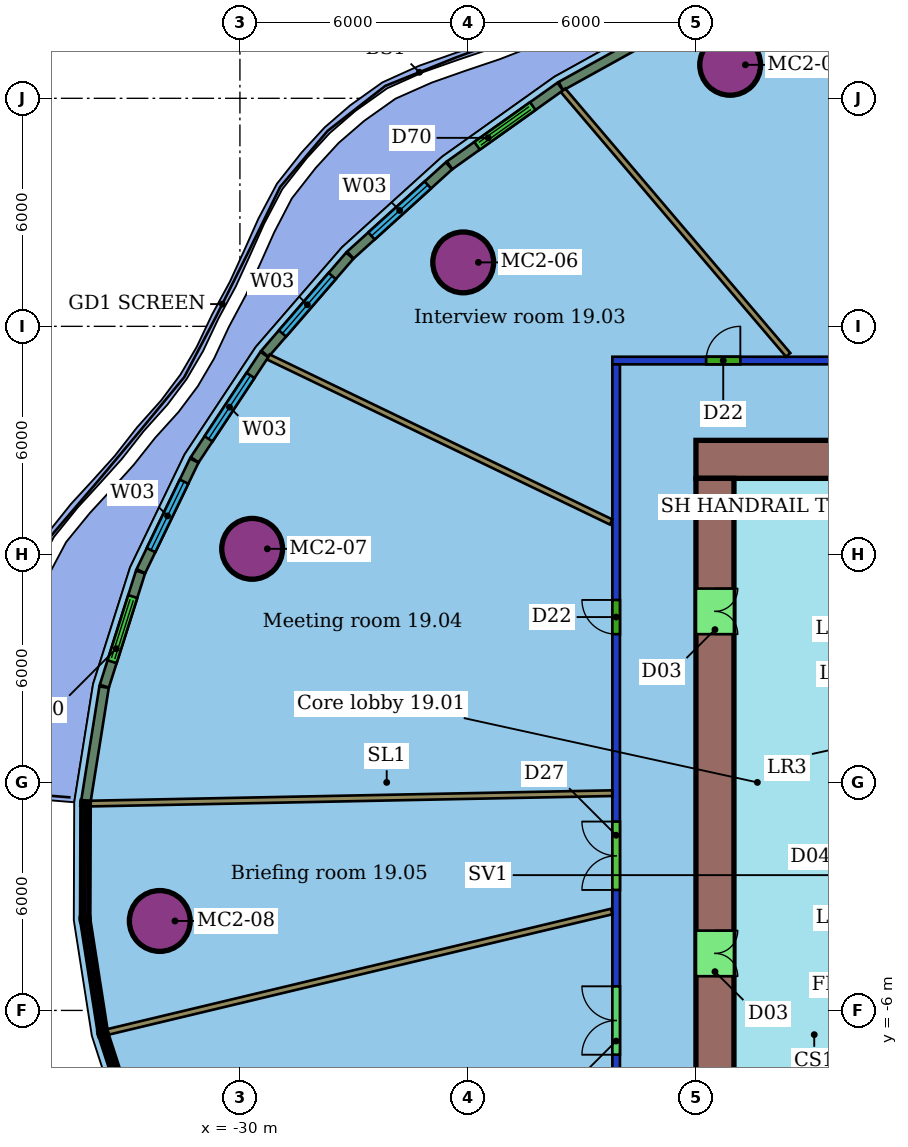
"""IFC4 building model, lengths in metres.
Left out: names, types, materials, properties, quantities, classifications, styles, units other than length and angle.
Written with IfcOpenShell. Run it as: python <this file> out.ifc"""

import sys

from ifc_helpers import new_model, si_unit, direction, frame, frame_2d, origin, origin_2d, place, context, subcontext, project, spatial, rectangle, hollow_circle, extrude, element, fill, save


model = new_model("IFC4")
c1 = context("Model", 3, precision=1e-05, world=origin(), true_north=direction((0.0, 1.0)))
c2 = subcontext(c1, "Body", "Model", "MODEL_VIEW")
j1 = project(units=[si_unit("LENGTHUNIT", "METRE"), si_unit("PLANEANGLEUNIT", "RADIAN")], contexts=[c1])
p1 = place(None, origin())
s1 = spatial("IfcSite", under=j1, at=p1, CompositionType="ELEMENT")
p2 = place(p1, origin())
s2 = spatial("IfcBuilding", under=s1, at=p2, CompositionType="ELEMENT")
p3 = place(p2, frame((0.0, 0.0, 88.6)))
s3 = spatial("IfcBuildingStorey", under=s2, at=p3, CompositionType="ELEMENT", Elevation=88.6)
for number, where, z_axis, x_axis in (
    (1, (-17.1, 18.881, 0.0), (0.0, 0.0, 1.0), (1.0, 0.0, 0.0)),
    (2, (-24.125, 13.683, 0.0), (0.0, 0.0, 1.0), (1.0, 0.0, 0.0)),
    (3, (-29.679, 6.146, 0.0), (0.0, 0.0, 1.0), (1.0, 0.0, 0.0)),
    (4, (-32.109, -3.646, 0.0), (0.0, 0.0, 1.0), (1.0, 0.0, 0.0)),
):
    element("IfcColumn", number, at=place(p3, frame(where, z_axis=z_axis, x_axis=x_axis)), inside=s3, PredefinedType="COLUMN", context=c2, shape_type="SweptSolid", body=[
        extrude(hollow_circle(Radius=0.8, WallThickness=0.055, at=origin_2d()), origin(), (0.0, 0.0, 1.0), 3.45),
    ])
p4 = place(p3, frame((-20.1, -11.0, 0.0), z_axis=(0.0, 0.0, 1.0), x_axis=(0.0, 1.0, 0.0)))
e5 = element("IfcWall", 5, at=p4, inside=s3, PredefinedType="PARTITIONING", context=c2, shape_type="SweptSolid", body=[
    extrude(rectangle(XDim=22.0, YDim=0.2, at=frame_2d((11.0, 0.0))), origin(), (0.0, 0.0, 1.0), 3.0),
])
p5 = place(p4, frame((14.9, 0.0, 0.0)))
e6 = element("IfcOpeningElement", 6, at=p5, cuts=e5, PredefinedType="OPENING", context=c2, shape_type="SweptSolid", body=[
    extrude(rectangle(XDim=0.9, YDim=2.1, at=frame_2d((0.45, 1.05))), frame((0.0, 0.11, 0.0), z_axis=(0.0, -1.0, 0.0), x_axis=(1.0, 0.0, 0.0)), (0.0, 0.0, 1.0), 0.22),
])
p6 = place(p4, frame((8.17, 0.0, 0.0)))
e7 = element("IfcOpeningElement", 7, at=p6, cuts=e5, PredefinedType="OPENING", context=c2, shape_type="SweptSolid", body=[
    extrude(rectangle(XDim=1.8, YDim=2.4, at=frame_2d((0.9, 1.2))), frame((0.0, 0.11, 0.0), z_axis=(0.0, -1.0, 0.0), x_axis=(1.0, 0.0, 0.0)), (0.0, 0.0, 1.0), 0.22),
])
p7 = place(p4, frame((3.835, 0.0, 0.0)))
e8 = element("IfcOpeningElement", 8, at=p7, cuts=e5, PredefinedType="OPENING", context=c2, shape_type="SweptSolid", body=[
    extrude(rectangle(XDim=1.8, YDim=2.1, at=frame_2d((0.9, 1.05))), frame((0.0, 0.11, 0.0), z_axis=(0.0, -1.0, 0.0), x_axis=(1.0, 0.0, 0.0)), (0.0, 0.0, 1.0), 0.22),
])
p8 = place(p3, frame((-20.2, 11.1, 0.0), z_axis=(0.0, 0.0, 1.0), x_axis=(1.0, 0.0, 0.0)))
e9 = element("IfcWall", 9, at=p8, inside=s3, PredefinedType="PARTITIONING", context=c2, shape_type="SweptSolid", body=[
    extrude(rectangle(XDim=28.4, YDim=0.2, at=frame_2d((14.2, 0.0))), origin(), (0.0, 0.0, 1.0), 3.0),
])
p9 = place(p8, frame((21.231, 0.0, 0.0)))
e10 = element("IfcOpeningElement", 10, at=p9, cuts=e9, PredefinedType="OPENING", context=c2, shape_type="SweptSolid", body=[
    extrude(rectangle(XDim=1.8, YDim=2.1, at=frame_2d((0.9, 1.05))), frame((0.0, 0.11, 0.0), z_axis=(0.0, -1.0, 0.0), x_axis=(1.0, 0.0, 0.0)), (0.0, 0.0, 1.0), 0.22),
])
p10 = place(p8, frame((13.062, 0.0, 0.0)))
e11 = element("IfcOpeningElement", 11, at=p10, cuts=e9, PredefinedType="OPENING", context=c2, shape_type="SweptSolid", body=[
    extrude(rectangle(XDim=1.8, YDim=2.1, at=frame_2d((0.9, 1.05))), frame((0.0, 0.11, 0.0), z_axis=(0.0, -1.0, 0.0), x_axis=(1.0, 0.0, 0.0)), (0.0, 0.0, 1.0), 0.22),
])
p11 = place(p8, frame((2.468, 0.0, 0.0)))
e12 = element("IfcOpeningElement", 12, at=p11, cuts=e9, PredefinedType="OPENING", context=c2, shape_type="SweptSolid", body=[
    extrude(rectangle(XDim=0.9, YDim=2.1, at=frame_2d((0.45, 1.05))), frame((0.0, 0.11, 0.0), z_axis=(0.0, -1.0, 0.0), x_axis=(1.0, 0.0, 0.0)), (0.0, 0.0, 1.0), 0.22),
])
p12 = place(p3, frame((-21.496, 18.209, 0.0), z_axis=(0.0, 0.0, 1.0), x_axis=(0.648105775004, -0.761550329529, 0.0)))
e13 = element("IfcWall", 13, at=p12, inside=s3, PredefinedType="PARTITIONING", context=c2, shape_type="SweptSolid", body=[
    extrude(rectangle(XDim=9.14, YDim=0.15, at=frame_2d((4.57, 0.0))), origin(), (0.0, 0.0, 1.0), 3.45),
])
p13 = place(p3, frame((-29.251, 11.193, 0.0), z_axis=(0.0, 0.0, 1.0), x_axis=(0.901024974185, -0.433767213946, 0.0)))
e14 = element("IfcWall", 14, at=p13, inside=s3, PredefinedType="PARTITIONING", context=c2, shape_type="SweptSolid", body=[
    extrude(rectangle(XDim=10.009, YDim=0.15, at=frame_2d((5.004, 0.0))), origin(), (0.0, 0.0, 1.0), 3.45),
])
p14 = place(p3, frame((-33.937, -0.557, 0.0), z_axis=(0.0, 0.0, 1.0), x_axis=(0.999801195259, 0.019939156436, 0.0)))
e15 = element("IfcWall", 15, at=p14, inside=s3, PredefinedType="PARTITIONING", context=c2, shape_type="SweptSolid", body=[
    extrude(rectangle(XDim=13.738, YDim=0.15, at=frame_2d((6.869, 0.0))), origin(), (0.0, 0.0, 1.0), 3.45),
])
p15 = place(p3, frame((-33.484, -6.568, 0.0), z_axis=(0.0, 0.0, 1.0), x_axis=(0.972610744355, 0.232439970669, 0.0)))
e16 = element("IfcWall", 16, at=p15, inside=s3, PredefinedType="PARTITIONING", context=c2, shape_type="SweptSolid", body=[
    extrude(rectangle(XDim=13.64, YDim=0.15, at=frame_2d((6.82, 0.0))), origin(), (0.0, 0.0, 1.0), 3.45),
])
p16 = place(p3, frame((-18.415, 20.059, 0.0), z_axis=(0.0, 0.0, 1.0), x_axis=(-0.874740773149, -0.484591147042, 0.0)))
e17 = element("IfcWall", 17, at=p16, inside=s3, PredefinedType="SOLIDWALL", context=c2, shape_type="SweptSolid", body=[
    extrude(rectangle(XDim=3.588, YDim=0.25, at=frame_2d((1.794, 0.0))), origin(), (0.0, 0.0, 1.0), 3.05),
])
p17 = place(p3, frame((-21.572, 18.308, 0.0), z_axis=(0.0, 0.0, 1.0), x_axis=(-0.814702052805, -0.579879785089, 0.0)))
e18 = element("IfcWall", 18, at=p17, inside=s3, PredefinedType="SOLIDWALL", context=c2, shape_type="SweptSolid", body=[
    extrude(rectangle(XDim=3.572, YDim=0.25, at=frame_2d((1.786, 0.0))), origin(), (0.0, 0.0, 1.0), 3.05),
])
p18 = place(p17, frame((0.886, 0.0, 0.0)))
e19 = element("IfcOpeningElement", 19, at=p18, cuts=e18, PredefinedType="OPENING", context=c2, shape_type="SweptSolid", body=[
    extrude(rectangle(XDim=1.8, YDim=2.4, at=frame_2d((0.9, 1.2))), frame((0.0, 0.135, 0.0), z_axis=(0.0, -1.0, 0.0), x_axis=(1.0, 0.0, 0.0)), (0.0, 0.0, 1.0), 0.27),
])
p19 = place(p3, frame((-24.5, 16.223, 0.0), z_axis=(0.0, 0.0, 1.0), x_axis=(-0.741507668803, -0.670944391962, 0.0)))
e20 = element("IfcWall", 20, at=p19, inside=s3, PredefinedType="SOLIDWALL", context=c2, shape_type="SweptSolid", body=[
    extrude(rectangle(XDim=3.498, YDim=0.25, at=frame_2d((1.749, 0.0))), origin(), (0.0, 0.0, 1.0), 3.05),
])
p20 = place(p19, frame((0.749, 0.0, 0.9)))
e21 = element("IfcOpeningElement", 21, at=p20, cuts=e20, PredefinedType="OPENING", context=c2, shape_type="SweptSolid", body=[
    extrude(rectangle(XDim=2.0, YDim=2.1, at=frame_2d((1.0, 1.05))), frame((0.0, 0.135, 0.0), z_axis=(0.0, -1.0, 0.0), x_axis=(1.0, 0.0, 0.0)), (0.0, 0.0, 1.0), 0.27),
])
p21 = place(p3, frame((-27.11, 13.859, 0.0), z_axis=(0.0, 0.0, 1.0), x_axis=(-0.654178480437, -0.756340211633, 0.0)))
e22 = element("IfcWall", 22, at=p21, inside=s3, PredefinedType="SOLIDWALL", context=c2, shape_type="SweptSolid", body=[
    extrude(rectangle(XDim=3.413, YDim=0.25, at=frame_2d((1.706, 0.0))), origin(), (0.0, 0.0, 1.0), 3.05),
])
p22 = place(p21, frame((0.706, 0.0, 0.9)))
e23 = element("IfcOpeningElement", 23, at=p22, cuts=e22, PredefinedType="OPENING", context=c2, shape_type="SweptSolid", body=[
    extrude(rectangle(XDim=2.0, YDim=2.1, at=frame_2d((1.0, 1.05))), frame((0.0, 0.135, 0.0), z_axis=(0.0, -1.0, 0.0), x_axis=(1.0, 0.0, 0.0)), (0.0, 0.0, 1.0), 0.27),
])
p23 = place(p3, frame((-29.357, 11.259, 0.0), z_axis=(0.0, 0.0, 1.0), x_axis=(-0.551983407384, -0.83385509411, 0.0)))
e24 = element("IfcWall", 24, at=p23, inside=s3, PredefinedType="SOLIDWALL", context=c2, shape_type="SweptSolid", body=[
    extrude(rectangle(XDim=3.322, YDim=0.25, at=frame_2d((1.661, 0.0))), origin(), (0.0, 0.0, 1.0), 3.05),
])
p24 = place(p23, frame((0.661, 0.0, 0.9)))
e25 = element("IfcOpeningElement", 25, at=p24, cuts=e24, PredefinedType="OPENING", context=c2, shape_type="SweptSolid", body=[
    extrude(rectangle(XDim=2.0, YDim=2.1, at=frame_2d((1.0, 1.05))), frame((0.0, 0.135, 0.0), z_axis=(0.0, -1.0, 0.0), x_axis=(1.0, 0.0, 0.0)), (0.0, 0.0, 1.0), 0.27),
])
p25 = place(p3, frame((-31.203, 8.468, 0.0), z_axis=(0.0, 0.0, 1.0), x_axis=(-0.434506070547, -0.900668904014, 0.0)))
e26 = element("IfcWall", 26, at=p25, inside=s3, PredefinedType="SOLIDWALL", context=c2, shape_type="SweptSolid", body=[
    extrude(rectangle(XDim=3.231, YDim=0.25, at=frame_2d((1.616, 0.0))), origin(), (0.0, 0.0, 1.0), 3.05),
])
p26 = place(p25, frame((0.616, 0.0, 0.9)))
e27 = element("IfcOpeningElement", 27, at=p26, cuts=e26, PredefinedType="OPENING", context=c2, shape_type="SweptSolid", body=[
    extrude(rectangle(XDim=2.0, YDim=2.1, at=frame_2d((1.0, 1.05))), frame((0.0, 0.135, 0.0), z_axis=(0.0, -1.0, 0.0), x_axis=(1.0, 0.0, 0.0)), (0.0, 0.0, 1.0), 0.27),
])
p27 = place(p3, frame((-32.616, 5.533, 0.0), z_axis=(0.0, 0.0, 1.0), x_axis=(-0.302352129866, -0.953196301695, 0.0)))
e28 = element("IfcWall", 28, at=p27, inside=s3, PredefinedType="SOLIDWALL", context=c2, shape_type="SweptSolid", body=[
    extrude(rectangle(XDim=3.148, YDim=0.25, at=frame_2d((1.574, 0.0))), origin(), (0.0, 0.0, 1.0), 3.05),
])
p28 = place(p27, frame((0.674, 0.0, 0.0)))
e29 = element("IfcOpeningElement", 29, at=p28, cuts=e28, PredefinedType="OPENING", context=c2, shape_type="SweptSolid", body=[
    extrude(rectangle(XDim=1.8, YDim=2.4, at=frame_2d((0.9, 1.2))), frame((0.0, 0.135, 0.0), z_axis=(0.0, -1.0, 0.0), x_axis=(1.0, 0.0, 0.0)), (0.0, 0.0, 1.0), 0.27),
])
p29 = place(p3, frame((-33.574, 2.507, 0.0), z_axis=(0.0, 0.0, 1.0), x_axis=(-0.157539068882, -0.987512755247, 0.0)))
e30 = element("IfcWall", 30, at=p29, inside=s3, PredefinedType="SOLIDWALL", context=c2, shape_type="SweptSolid", body=[
    extrude(rectangle(XDim=3.037, YDim=0.25, at=frame_2d((1.519, 0.0))), origin(), (0.0, 0.0, 1.0), 3.05),
])
p30 = place(p3, frame((-6.0, 8.5, 0.0), z_axis=(0.0, 0.0, 1.0), x_axis=(-1.0, 0.0, 0.0)))
e31 = element("IfcWall", 31, at=p30, inside=s3, PredefinedType="SHEAR", context=c2, shape_type="SweptSolid", body=[
    extrude(rectangle(XDim=12.0, YDim=1.0, at=frame_2d((6.0, 0.0))), origin(), (0.0, 0.0, 1.0), 3.3),
])
p31 = place(p30, frame((5.2, 0.0, 0.0)))
e32 = element("IfcOpeningElement", 32, at=p31, cuts=e31, PredefinedType="OPENING", context=c2, shape_type="SweptSolid", body=[
    extrude(rectangle(XDim=1.2, YDim=2.1, at=frame_2d((0.6, 1.05))), frame((0.0, 0.51, 0.0), z_axis=(0.0, -1.0, 0.0), x_axis=(1.0, 0.0, 0.0)), (0.0, 0.0, 1.0), 1.02),
])
p32 = place(p3, frame((-17.5, 8.0, 0.0), z_axis=(0.0, 0.0, 1.0), x_axis=(0.0, -1.0, 0.0)))
e33 = element("IfcWall", 33, at=p32, inside=s3, PredefinedType="SHEAR", context=c2, shape_type="SweptSolid", body=[
    extrude(rectangle(XDim=16.0, YDim=1.0, at=frame_2d((8.0, 0.0))), origin(), (0.0, 0.0, 1.0), 3.3),
])
p33 = place(p32, frame((11.9, 0.0, 0.0)))
e34 = element("IfcOpeningElement", 34, at=p33, cuts=e33, PredefinedType="OPENING", context=c2, shape_type="SweptSolid", body=[
    extrude(rectangle(XDim=1.2, YDim=2.1, at=frame_2d((0.6, 1.05))), frame((0.0, 0.51, 0.0), z_axis=(0.0, -1.0, 0.0), x_axis=(1.0, 0.0, 0.0)), (0.0, 0.0, 1.0), 1.02),
])
p34 = place(p32, frame((2.9, 0.0, 0.0)))
e35 = element("IfcOpeningElement", 35, at=p34, cuts=e33, PredefinedType="OPENING", context=c2, shape_type="SweptSolid", body=[
    extrude(rectangle(XDim=1.2, YDim=2.1, at=frame_2d((0.6, 1.05))), frame((0.0, 0.51, 0.0), z_axis=(0.0, -1.0, 0.0), x_axis=(1.0, 0.0, 0.0)), (0.0, 0.0, 1.0), 1.02),
])
p35 = place(p11, origin())
e36 = element("IfcDoor", 36, at=p35, inside=s3, OperationType="SINGLE_SWING_RIGHT", PredefinedType="DOOR", context=c2, shape_type="SweptSolid", body=[
    extrude(rectangle(XDim=0.9, YDim=2.1, at=frame_2d((0.45, 1.05))), frame((0.0, 0.025, 0.0), z_axis=(0.0, -1.0, 0.0), x_axis=(1.0, 0.0, 0.0)), (0.0, 0.0, 1.0), 0.05),
])
fill(e12, e36)
p36 = place(p5, origin())
e37 = element("IfcDoor", 37, at=p36, inside=s3, OperationType="SINGLE_SWING_RIGHT", PredefinedType="DOOR", context=c2, shape_type="SweptSolid", body=[
    extrude(rectangle(XDim=0.9, YDim=2.1, at=frame_2d((0.45, 1.05))), frame((0.0, 0.025, 0.0), z_axis=(0.0, -1.0, 0.0), x_axis=(1.0, 0.0, 0.0)), (0.0, 0.0, 1.0), 0.05),
])
fill(e6, e37)
p37 = place(p6, origin())
e38 = element("IfcDoor", 38, at=p37, inside=s3, OperationType="DOUBLE_DOOR_SINGLE_SWING", PredefinedType="DOOR", context=c2, shape_type="SweptSolid", body=[
    extrude(rectangle(XDim=1.8, YDim=2.4, at=frame_2d((0.9, 1.2))), frame((0.0, 0.025, 0.0), z_axis=(0.0, -1.0, 0.0), x_axis=(1.0, 0.0, 0.0)), (0.0, 0.0, 1.0), 0.05),
])
fill(e7, e38)
p38 = place(p7, origin())
e39 = element("IfcDoor", 39, at=p38, inside=s3, OperationType="DOUBLE_DOOR_SINGLE_SWING", PredefinedType="DOOR", context=c2, shape_type="SweptSolid", body=[
    extrude(rectangle(XDim=1.8, YDim=2.1, at=frame_2d((0.9, 1.05))), frame((0.0, 0.025, 0.0), z_axis=(0.0, -1.0, 0.0), x_axis=(1.0, 0.0, 0.0)), (0.0, 0.0, 1.0), 0.05),
])
fill(e8, e39)
p39 = place(p18, origin())
e40 = element("IfcDoor", 40, at=p39, inside=s3, OperationType="DOUBLE_DOOR_SLIDING", PredefinedType="DOOR", context=c2, shape_type="SweptSolid", body=[
    extrude(rectangle(XDim=1.8, YDim=2.4, at=frame_2d((0.9, 1.2))), frame((0.0, 0.025, 0.0), z_axis=(0.0, -1.0, 0.0), x_axis=(1.0, 0.0, 0.0)), (0.0, 0.0, 1.0), 0.05),
])
fill(e19, e40)
p40 = place(p20, origin())
e41 = element("IfcWindow", 41, at=p40, inside=s3, PartitioningType="SINGLE_PANEL", PredefinedType="WINDOW", context=c2, shape_type="SweptSolid", body=[
    extrude(rectangle(XDim=2.0, YDim=2.1, at=frame_2d((1.0, 1.05))), frame((0.0, 0.03, 0.0), z_axis=(0.0, -1.0, 0.0), x_axis=(1.0, 0.0, 0.0)), (0.0, 0.0, 1.0), 0.06),
])
fill(e21, e41)
p41 = place(p22, origin())
e42 = element("IfcWindow", 42, at=p41, inside=s3, PartitioningType="SINGLE_PANEL", PredefinedType="WINDOW", context=c2, shape_type="SweptSolid", body=[
    extrude(rectangle(XDim=2.0, YDim=2.1, at=frame_2d((1.0, 1.05))), frame((0.0, 0.03, 0.0), z_axis=(0.0, -1.0, 0.0), x_axis=(1.0, 0.0, 0.0)), (0.0, 0.0, 1.0), 0.06),
])
fill(e23, e42)
p42 = place(p24, origin())
e43 = element("IfcWindow", 43, at=p42, inside=s3, PartitioningType="SINGLE_PANEL", PredefinedType="WINDOW", context=c2, shape_type="SweptSolid", body=[
    extrude(rectangle(XDim=2.0, YDim=2.1, at=frame_2d((1.0, 1.05))), frame((0.0, 0.03, 0.0), z_axis=(0.0, -1.0, 0.0), x_axis=(1.0, 0.0, 0.0)), (0.0, 0.0, 1.0), 0.06),
])
fill(e25, e43)
p43 = place(p26, origin())
e44 = element("IfcWindow", 44, at=p43, inside=s3, PartitioningType="SINGLE_PANEL", PredefinedType="WINDOW", context=c2, shape_type="SweptSolid", body=[
    extrude(rectangle(XDim=2.0, YDim=2.1, at=frame_2d((1.0, 1.05))), frame((0.0, 0.03, 0.0), z_axis=(0.0, -1.0, 0.0), x_axis=(1.0, 0.0, 0.0)), (0.0, 0.0, 1.0), 0.06),
])
fill(e27, e44)
p44 = place(p28, origin())
e45 = element("IfcDoor", 45, at=p44, inside=s3, OperationType="DOUBLE_DOOR_SLIDING", PredefinedType="DOOR", context=c2, shape_type="SweptSolid", body=[
    extrude(rectangle(XDim=1.8, YDim=2.4, at=frame_2d((0.9, 1.2))), frame((0.0, 0.025, 0.0), z_axis=(0.0, -1.0, 0.0), x_axis=(1.0, 0.0, 0.0)), (0.0, 0.0, 1.0), 0.05),
])
fill(e29, e45)
p45 = place(p33, origin())
e46 = element("IfcDoor", 46, at=p45, inside=s3, OperationType="DOUBLE_DOOR_SINGLE_SWING", PredefinedType="NOTDEFINED", context=c2, shape_type="SweptSolid", body=[
    extrude(rectangle(XDim=1.2, YDim=2.1, at=frame_2d((0.6, 1.05))), frame((0.0, 0.025, 0.0), z_axis=(0.0, -1.0, 0.0), x_axis=(1.0, 0.0, 0.0)), (0.0, 0.0, 1.0), 0.05),
])
fill(e34, e46)
p46 = place(p34, origin())
e47 = element("IfcDoor", 47, at=p46, inside=s3, OperationType="DOUBLE_DOOR_SINGLE_SWING", PredefinedType="NOTDEFINED", context=c2, shape_type="SweptSolid", body=[
    extrude(rectangle(XDim=1.2, YDim=2.1, at=frame_2d((0.6, 1.05))), frame((0.0, 0.025, 0.0), z_axis=(0.0, -1.0, 0.0), x_axis=(1.0, 0.0, 0.0)), (0.0, 0.0, 1.0), 0.05),
])
fill(e35, e47)
save(model, sys.argv[1])
